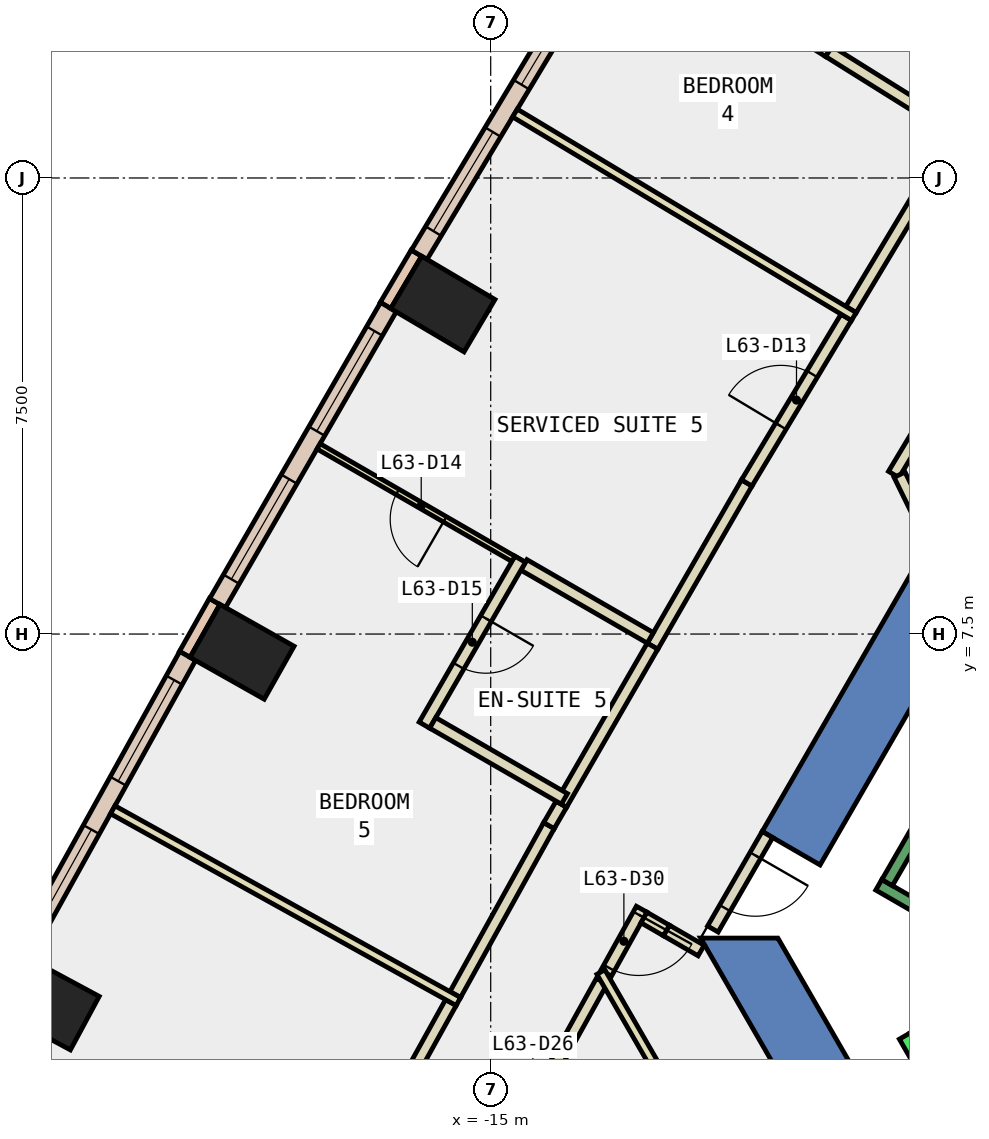
"""IFC4 building model, lengths in metres.
Left out: names, types, materials, properties, quantities, classifications, styles, units other than length and angle.
Written with IfcOpenShell. Run it as: python <this file> out.ifc"""

import sys

from ifc_helpers import new_model, si_unit, direction, frame, frame_2d, origin, origin_2d, place, context, subcontext, project, spatial, polyline, rectangle, outline, extrude, element, fill, save


model = new_model("IFC4")
c1 = context("Model", 3, precision=1e-05, world=origin(), true_north=direction((0.0, 1.0)))
c2 = subcontext(c1, "Body", "Model", "MODEL_VIEW")
j1 = project(units=[si_unit("LENGTHUNIT", "METRE"), si_unit("PLANEANGLEUNIT", "RADIAN")], contexts=[c1])
p1 = place(None, origin())
s1 = spatial("IfcSite", under=j1, at=p1, CompositionType="ELEMENT")
p2 = place(p1, origin())
s2 = spatial("IfcBuilding", under=s1, at=p2, CompositionType="ELEMENT")
p3 = place(p2, frame((0.0, 0.0, 273.8)))
s3 = spatial("IfcBuildingStorey", under=s2, at=p3, CompositionType="ELEMENT", Elevation=273.8)
for number, where, z_axis, x_axis in (
    (1, (-15.787, 12.927, -0.34), (0.0, 0.0, 1.0), (0.509, 0.861, 0.0)),
    (2, (-19.089, 7.208, -0.34), (0.0, 0.0, 1.0), (0.491, 0.871, 0.0)),
    (3, (-22.292, 1.433, -0.34), (0.0, 0.0, 1.0), (0.474, 0.881, 0.0)),
):
    element("IfcColumn", number, at=place(p3, frame(where, z_axis=z_axis, x_axis=x_axis)), inside=s3, PredefinedType="COLUMN", context=c2, shape_type="SweptSolid", body=[
        extrude(rectangle(XDim=1.0, YDim=1.4, at=origin_2d()), origin(), (0.0, 0.0, 1.0), 3.6),
    ])
p4 = place(p3, frame((0.0, 0.0, -0.34)))
e4 = element("IfcWall", 4, at=p4, inside=s3, PredefinedType="SHEAR", context=c2, shape_type="SweptSolid", body=[
    extrude(outline(polyline([(-10.535, 4.253), (-9.583, 3.703), (-5.138, 11.4), (-5.774, 12.5), (-10.535, 4.253)])), origin(), (0.0, 0.0, 1.0), 3.6),
])
p5 = place(p3, frame((0.0, 0.0, -0.34)))
e5 = element("IfcWall", 5, at=p5, inside=s3, PredefinedType="SHEAR", context=c2, shape_type="SweptSolid", body=[
    extrude(outline(polyline([(-11.547, 2.5), (-5.774, -7.5), (-5.138, -6.4), (-10.277, 2.5), (-11.547, 2.5)])), origin(), (0.0, 0.0, 1.0), 3.6),
])
p6 = place(p3, frame((-16.222, 13.765, 0.0), z_axis=(0.0, 0.0, 1.0), x_axis=(-0.508268432768, -0.861198699634, 0.0)))
e6 = element("IfcWall", 6, at=p6, inside=s3, PredefinedType="STANDARD", context=c2, shape_type="SweptSolid", body=[
    extrude(rectangle(XDim=1.0, YDim=0.2, at=frame_2d((0.5, 0.0))), origin(), (0.0, 0.0, 1.0), 3.26),
])
p7 = place(p3, frame((-19.54, 8.036, 0.0), z_axis=(0.0, 0.0, 1.0), x_axis=(-0.491848119507, -0.870681013539, 0.0)))
e7 = element("IfcWall", 7, at=p7, inside=s3, PredefinedType="STANDARD", context=c2, shape_type="SweptSolid", body=[
    extrude(rectangle(XDim=1.0, YDim=0.2, at=frame_2d((0.5, 0.0))), origin(), (0.0, 0.0, 1.0), 3.26),
])
p8 = place(p3, frame((-13.282, 18.554, 0.0), z_axis=(0.0, 0.0, 1.0), x_axis=(-0.515006791362, -0.857186096977, 0.0)))
e8 = element("IfcWall", 8, at=p8, inside=s3, PredefinedType="STANDARD", context=c2, shape_type="SweptSolid", body=[
    extrude(rectangle(XDim=5.619, YDim=0.3, at=frame_2d((2.81, 0.0))), origin(), (0.0, 0.0, 1.0), 3.26),
])
p9 = place(p8, frame((0.455, 0.0, 0.9)))
e9 = element("IfcOpeningElement", 9, at=p9, cuts=e8, PredefinedType="OPENING", context=c2, shape_type="SweptSolid", body=[
    extrude(rectangle(XDim=1.9, YDim=2.0, at=frame_2d((0.95, 1.0))), frame((0.0, 0.16, 0.0), z_axis=(0.0, -1.0, 0.0), x_axis=(1.0, 0.0, 0.0)), (0.0, 0.0, 1.0), 0.32),
])
p10 = place(p8, frame((3.265, 0.0, 0.9)))
e10 = element("IfcOpeningElement", 10, at=p10, cuts=e8, PredefinedType="OPENING", context=c2, shape_type="SweptSolid", body=[
    extrude(rectangle(XDim=1.9, YDim=2.0, at=frame_2d((0.95, 1.0))), frame((0.0, 0.16, 0.0), z_axis=(0.0, -1.0, 0.0), x_axis=(1.0, 0.0, 0.0)), (0.0, 0.0, 1.0), 0.32),
])
p11 = place(p3, frame((-16.682, 12.877, 0.0), z_axis=(0.0, 0.0, 1.0), x_axis=(-0.49999685976, -0.866027216796, 0.0)))
e11 = element("IfcWall", 11, at=p11, inside=s3, PredefinedType="STANDARD", context=c2, shape_type="SweptSolid", body=[
    extrude(rectangle(XDim=5.622, YDim=0.3, at=frame_2d((2.811, 0.0))), origin(), (0.0, 0.0, 1.0), 3.26),
])
p12 = place(p11, frame((0.456, 0.0, 0.9)))
e12 = element("IfcOpeningElement", 12, at=p12, cuts=e11, PredefinedType="OPENING", context=c2, shape_type="SweptSolid", body=[
    extrude(rectangle(XDim=1.9, YDim=2.0, at=frame_2d((0.95, 1.0))), frame((0.0, 0.16, 0.0), z_axis=(0.0, -1.0, 0.0), x_axis=(1.0, 0.0, 0.0)), (0.0, 0.0, 1.0), 0.32),
])
p13 = place(p11, frame((3.267, 0.0, 0.9)))
e13 = element("IfcOpeningElement", 13, at=p13, cuts=e11, PredefinedType="OPENING", context=c2, shape_type="SweptSolid", body=[
    extrude(rectangle(XDim=1.9, YDim=2.0, at=frame_2d((0.95, 1.0))), frame((0.0, 0.16, 0.0), z_axis=(0.0, -1.0, 0.0), x_axis=(1.0, 0.0, 0.0)), (0.0, 0.0, 1.0), 0.32),
])
p14 = place(p3, frame((-19.984, 7.14, 0.0), z_axis=(0.0, 0.0, 1.0), x_axis=(-0.485049005017, -0.874486971162, 0.0)))
e14 = element("IfcWall", 14, at=p14, inside=s3, PredefinedType="STANDARD", context=c2, shape_type="SweptSolid", body=[
    extrude(rectangle(XDim=5.62, YDim=0.3, at=frame_2d((2.81, 0.0))), origin(), (0.0, 0.0, 1.0), 3.26),
])
p15 = place(p14, frame((0.455, 0.0, 0.9)))
e15 = element("IfcOpeningElement", 15, at=p15, cuts=e14, PredefinedType="OPENING", context=c2, shape_type="SweptSolid", body=[
    extrude(rectangle(XDim=1.9, YDim=2.0, at=frame_2d((0.95, 1.0))), frame((0.0, 0.16, 0.0), z_axis=(0.0, -1.0, 0.0), x_axis=(1.0, 0.0, 0.0)), (0.0, 0.0, 1.0), 0.32),
])
p16 = place(p14, frame((3.265, 0.0, 0.9)))
e16 = element("IfcOpeningElement", 16, at=p16, cuts=e14, PredefinedType="OPENING", context=c2, shape_type="SweptSolid", body=[
    extrude(rectangle(XDim=1.9, YDim=2.0, at=frame_2d((0.95, 1.0))), frame((0.0, 0.16, 0.0), z_axis=(0.0, -1.0, 0.0), x_axis=(1.0, 0.0, 0.0)), (0.0, 0.0, 1.0), 0.32),
])
p17 = place(p3, frame((-11.539, 2.295, 0.0), z_axis=(0.0, 0.0, 1.0), x_axis=(-0.86577241902, 0.500437926684, 0.0)))
e17 = element("IfcWall", 17, at=p17, inside=s3, PredefinedType="PARTITIONING", context=c2, shape_type="SweptSolid", body=[
    extrude(rectangle(XDim=0.66, YDim=0.2, at=frame_2d((0.33, 0.0))), origin(), (0.0, 0.0, 1.0), 2.4),
])
p18 = place(p3, frame((-12.517, 2.975, 0.0), z_axis=(0.0, 0.0, 1.0), x_axis=(-0.485195833999, -0.87440551386, 0.0)))
e18 = element("IfcWall", 18, at=p18, inside=s3, PredefinedType="PARTITIONING", context=c2, shape_type="SweptSolid", body=[
    extrude(rectangle(XDim=1.206, YDim=0.2, at=frame_2d((0.603, 0.0))), origin(), (0.0, 0.0, 1.0), 3.26),
])
p19 = place(p18, frame((0.103, 0.0, 0.0)))
e19 = element("IfcOpeningElement", 19, at=p19, cuts=e18, PredefinedType="OPENING", context=c2, shape_type="SweptSolid", body=[
    extrude(rectangle(XDim=1.0, YDim=2.1, at=frame_2d((0.5, 1.05))), frame((0.0, 0.11, 0.0), z_axis=(0.0, -1.0, 0.0), x_axis=(1.0, 0.0, 0.0)), (0.0, 0.0, 1.0), 0.22),
])
p20 = place(p3, frame((-5.885, 14.264, 0.0), z_axis=(0.0, 0.0, 1.0), x_axis=(-0.514971458129, -0.857207324579, 0.0)))
e20 = element("IfcWall", 20, at=p20, inside=s3, PredefinedType="PARTITIONING", context=c2, shape_type="SweptSolid", body=[
    extrude(rectangle(XDim=4.83, YDim=0.2, at=frame_2d((2.415, 0.0))), origin(), (0.0, 0.0, 1.0), 3.26),
])
p21 = place(p20, frame((1.915, 0.0, 0.0)))
e21 = element("IfcOpeningElement", 21, at=p21, cuts=e20, PredefinedType="OPENING", context=c2, shape_type="SweptSolid", body=[
    extrude(rectangle(XDim=1.0, YDim=2.1, at=frame_2d((0.5, 1.05))), frame((0.0, 0.11, 0.0), z_axis=(0.0, -1.0, 0.0), x_axis=(1.0, 0.0, 0.0)), (0.0, 0.0, 1.0), 0.22),
])
p22 = place(p3, frame((-8.276, 10.12, 0.0), z_axis=(0.0, 0.0, 1.0), x_axis=(0.440226122236, -0.897886942382, 0.0)))
e22 = element("IfcWall", 22, at=p22, inside=s3, PredefinedType="PARTITIONING", context=c2, shape_type="SweptSolid", body=[
    extrude(rectangle(XDim=1.176, YDim=0.2, at=frame_2d((0.588, 0.0))), origin(), (0.0, 0.0, 1.0), 3.26),
])
p23 = place(p3, frame((-13.174, 1.79, 0.0), z_axis=(0.0, 0.0, 1.0), x_axis=(-0.485079003918, -0.874470331091, 0.0)))
e23 = element("IfcWall", 23, at=p23, inside=s3, PredefinedType="PARTITIONING", context=c2, shape_type="SweptSolid", body=[
    extrude(rectangle(XDim=4.669, YDim=0.2, at=frame_2d((2.334, 0.0))), origin(), (0.0, 0.0, 1.0), 3.26),
])
p24 = place(p23, frame((1.834, 0.0, 0.0)))
e24 = element("IfcOpeningElement", 24, at=p24, cuts=e23, PredefinedType="OPENING", context=c2, shape_type="SweptSolid", body=[
    extrude(rectangle(XDim=1.0, YDim=2.1, at=frame_2d((0.5, 1.05))), frame((0.0, 0.11, 0.0), z_axis=(0.0, -1.0, 0.0), x_axis=(1.0, 0.0, 0.0)), (0.0, 0.0, 1.0), 0.22),
])
p25 = place(p3, frame((-9.075, 12.837, 0.0), z_axis=(0.0, 0.0, 1.0), x_axis=(0.514620055475, 0.857418333431, 0.0)))
e25 = element("IfcWall", 25, at=p25, inside=s3, PredefinedType="PARTITIONING", context=c2, shape_type="SweptSolid", body=[
    extrude(rectangle(XDim=3.177, YDim=0.2, at=frame_2d((1.588, 0.0))), origin(), (0.0, 0.0, 1.0), 3.26),
])
p26 = place(p3, frame((-12.338, 7.3, 0.0), z_axis=(0.0, 0.0, 1.0), x_axis=(0.4996633593, 0.866219676164, 0.0)))
e26 = element("IfcWall", 26, at=p26, inside=s3, PredefinedType="PARTITIONING", context=c2, shape_type="SweptSolid", body=[
    extrude(rectangle(XDim=3.1, YDim=0.2, at=frame_2d((1.55, 0.0))), origin(), (0.0, 0.0, 1.0), 3.26),
])
p27 = place(p3, frame((-10.789, 9.985, 0.0), z_axis=(0.0, 0.0, 1.0), x_axis=(0.51487988517, 0.857262330823, 0.0)))
e27 = element("IfcWall", 27, at=p27, inside=s3, PredefinedType="PARTITIONING", context=c2, shape_type="SweptSolid", body=[
    extrude(rectangle(XDim=3.177, YDim=0.2, at=frame_2d((1.589, 0.0))), origin(), (0.0, 0.0, 1.0), 3.26),
])
p28 = place(p27, frame((1.089, 0.0, 0.0)))
e28 = element("IfcOpeningElement", 28, at=p28, cuts=e27, PredefinedType="OPENING", context=c2, shape_type="SweptSolid", body=[
    extrude(rectangle(XDim=1.0, YDim=2.1, at=frame_2d((0.5, 1.05))), frame((0.0, 0.11, 0.0), z_axis=(0.0, -1.0, 0.0), x_axis=(1.0, 0.0, 0.0)), (0.0, 0.0, 1.0), 0.22),
])
p29 = place(p3, frame((-15.583, 1.571, 0.0), z_axis=(0.0, 0.0, 1.0), x_axis=(0.484944791944, 0.874544766588, 0.0)))
e29 = element("IfcWall", 29, at=p29, inside=s3, PredefinedType="PARTITIONING", context=c2, shape_type="SweptSolid", body=[
    extrude(rectangle(XDim=3.178, YDim=0.2, at=frame_2d((1.589, 0.0))), origin(), (0.0, 0.0, 1.0), 3.26),
])
p30 = place(p3, frame((-14.042, 4.35, 0.0), z_axis=(0.0, 0.0, 1.0), x_axis=(0.501816902032, 0.864973870608, 0.0)))
e30 = element("IfcWall", 30, at=p30, inside=s3, PredefinedType="PARTITIONING", context=c2, shape_type="SweptSolid", body=[
    extrude(rectangle(XDim=0.407, YDim=0.2, at=frame_2d((0.203, 0.0))), origin(), (0.0, 0.0, 1.0), 3.26),
])
p31 = place(p3, frame((-13.838, 4.702, 0.0), z_axis=(0.0, 0.0, 1.0), x_axis=(0.499543983968, 0.866288524731, 0.0)))
e31 = element("IfcWall", 31, at=p31, inside=s3, PredefinedType="PARTITIONING", context=c2, shape_type="SweptSolid", body=[
    extrude(rectangle(XDim=3.0, YDim=0.2, at=frame_2d((1.5, 0.0))), origin(), (0.0, 0.0, 1.0), 3.26),
])
p32 = place(p3, frame((-17.196, -1.338, 0.0), z_axis=(0.0, 0.0, 1.0), x_axis=(0.485107756493, 0.87445438108, 0.0)))
e32 = element("IfcWall", 32, at=p32, inside=s3, PredefinedType="PARTITIONING", context=c2, shape_type="SweptSolid", body=[
    extrude(rectangle(XDim=3.177, YDim=0.2, at=frame_2d((1.588, 0.0))), origin(), (0.0, 0.0, 1.0), 3.26),
])
p33 = place(p3, frame((-13.188, 1.942, 0.0), z_axis=(0.0, 0.0, 1.0), x_axis=(0.500061177503, -0.865990080056, 0.0)))
e33 = element("IfcWall", 33, at=p33, inside=s3, PredefinedType="PARTITIONING", context=c2, shape_type="SweptSolid", body=[
    extrude(rectangle(XDim=6.447, YDim=0.15, at=frame_2d((3.224, 0.0))), origin(), (0.0, 0.0, 1.0), 3.26),
])
p34 = place(p3, frame((-7.907, 19.72, 0.0), z_axis=(0.0, 0.0, 1.0), x_axis=(-0.529915322147, -0.848050559433, 0.0)))
e34 = element("IfcWall", 34, at=p34, inside=s3, PredefinedType="PARTITIONING", context=c2, shape_type="SweptSolid", body=[
    extrude(rectangle(XDim=3.149, YDim=0.2, at=frame_2d((1.575, 0.0))), origin(), (0.0, 0.0, 1.0), 3.26),
])
p35 = place(p34, frame((1.125, 0.0, 0.0)))
e35 = element("IfcOpeningElement", 35, at=p35, cuts=e34, PredefinedType="OPENING", context=c2, shape_type="SweptSolid", body=[
    extrude(rectangle(XDim=0.9, YDim=2.1, at=frame_2d((0.45, 1.05))), frame((0.0, 0.11, 0.0), z_axis=(0.0, -1.0, 0.0), x_axis=(1.0, 0.0, 0.0)), (0.0, 0.0, 1.0), 0.22),
])
p36 = place(p3, frame((-9.438, 17.081, 0.0), z_axis=(0.0, 0.0, 1.0), x_axis=(0.847992817371, -0.530007718516, 0.0)))
e36 = element("IfcWall", 36, at=p36, inside=s3, PredefinedType="PARTITIONING", context=c2, shape_type="SweptSolid", body=[
    extrude(rectangle(XDim=2.5, YDim=0.2, at=frame_2d((1.25, 0.0))), origin(), (0.0, 0.0, 1.0), 3.26),
])
p37 = place(p3, frame((-9.028, 12.722, 0.0), z_axis=(0.0, 0.0, 1.0), x_axis=(-0.857330501016, 0.514766366449, 0.0)))
e37 = element("IfcWall", 37, at=p37, inside=s3, PredefinedType="PARTITIONING", context=c2, shape_type="SweptSolid", body=[
    extrude(rectangle(XDim=6.5, YDim=0.15, at=frame_2d((3.25, 0.0))), origin(), (0.0, 0.0, 1.0), 3.26),
])
p38 = place(p3, frame((-14.454, 8.637, 0.0), z_axis=(0.0, 0.0, 1.0), x_axis=(-0.865995823051, 0.500051231833, 0.0)))
e38 = element("IfcWall", 38, at=p38, inside=s3, PredefinedType="PARTITIONING", context=c2, shape_type="SweptSolid", body=[
    extrude(rectangle(XDim=3.899, YDim=0.1, at=frame_2d((1.95, 0.0))), origin(), (0.0, 0.0, 1.0), 3.26),
])
p39 = place(p38, frame((1.5, 0.0, 0.0)))
e39 = element("IfcOpeningElement", 39, at=p39, cuts=e38, PredefinedType="OPENING", context=c2, shape_type="SweptSolid", body=[
    extrude(rectangle(XDim=0.9, YDim=2.1, at=frame_2d((0.45, 1.05))), frame((0.0, 0.06, 0.0), z_axis=(0.0, -1.0, 0.0), x_axis=(1.0, 0.0, 0.0)), (0.0, 0.0, 1.0), 0.12),
])
p40 = place(p3, frame((-12.375, 7.437, 0.0), z_axis=(0.0, 0.0, 1.0), x_axis=(-0.866100915363, 0.499869187296, 0.0)))
e40 = element("IfcWall", 40, at=p40, inside=s3, PredefinedType="PARTITIONING", context=c2, shape_type="SweptSolid", body=[
    extrude(rectangle(XDim=2.401, YDim=0.2, at=frame_2d((1.2, 0.0))), origin(), (0.0, 0.0, 1.0), 3.26),
])
p41 = place(p3, frame((-14.515, 8.73, 0.0), z_axis=(0.0, 0.0, 1.0), x_axis=(-0.500039995618, -0.866002311072, 0.0)))
e41 = element("IfcWall", 41, at=p41, inside=s3, PredefinedType="PARTITIONING", context=c2, shape_type="SweptSolid", body=[
    extrude(rectangle(XDim=3.15, YDim=0.2, at=frame_2d((1.575, 0.0))), origin(), (0.0, 0.0, 1.0), 3.26),
])
p42 = place(p41, frame((1.125, 0.0, 0.0)))
e42 = element("IfcOpeningElement", 42, at=p42, cuts=e41, PredefinedType="OPENING", context=c2, shape_type="SweptSolid", body=[
    extrude(rectangle(XDim=0.9, YDim=2.1, at=frame_2d((0.45, 1.05))), frame((0.0, 0.11, 0.0), z_axis=(0.0, -1.0, 0.0), x_axis=(1.0, 0.0, 0.0)), (0.0, 0.0, 1.0), 0.22),
])
p43 = place(p3, frame((-15.953, 6.039, 0.0), z_axis=(0.0, 0.0, 1.0), x_axis=(0.865998541277, -0.500046524342, 0.0)))
e43 = element("IfcWall", 43, at=p43, inside=s3, PredefinedType="PARTITIONING", context=c2, shape_type="SweptSolid", body=[
    extrude(rectangle(XDim=2.5, YDim=0.2, at=frame_2d((1.25, 0.0))), origin(), (0.0, 0.0, 1.0), 3.26),
])
p44 = place(p3, frame((-15.532, 1.457, 0.0), z_axis=(0.0, 0.0, 1.0), x_axis=(-0.874467143452, 0.485084750351, 0.0)))
e44 = element("IfcWall", 44, at=p44, inside=s3, PredefinedType="PARTITIONING", context=c2, shape_type="SweptSolid", body=[
    extrude(rectangle(XDim=6.5, YDim=0.15, at=frame_2d((3.25, 0.0))), origin(), (0.0, 0.0, 1.0), 3.26),
])
p45 = place(p3, frame((-10.449, 4.203, 0.0), z_axis=(0.0, 0.0, 1.0), x_axis=(-0.499914839587, -0.866074565589, 0.0)))
e45 = element("IfcWall", 45, at=p45, inside=s3, PredefinedType="PARTITIONING", context=c2, shape_type="SweptSolid", body=[
    extrude(rectangle(XDim=1.794, YDim=0.2, at=frame_2d((0.897, 0.0))), origin(), (0.0, 0.0, 1.0), 2.4),
])
p46 = place(p45, frame((0.397, 0.0, 0.0)))
e46 = element("IfcOpeningElement", 46, at=p46, cuts=e45, PredefinedType="OPENING", context=c2, shape_type="SweptSolid", body=[
    extrude(rectangle(XDim=1.0, YDim=2.1, at=frame_2d((0.5, 1.05))), frame((0.0, 0.11, 0.0), z_axis=(0.0, -1.0, 0.0), x_axis=(1.0, 0.0, 0.0)), (0.0, 0.0, 1.0), 0.22),
])
p47 = place(p3, frame((-12.11, 2.625, 0.0), z_axis=(0.0, 0.0, 1.0), x_axis=(-0.86611877815, 0.499838235968, 0.0)))
e47 = element("IfcWall", 47, at=p47, inside=s3, PredefinedType="PARTITIONING", context=c2, shape_type="SweptSolid", body=[
    extrude(rectangle(XDim=0.426, YDim=0.2, at=frame_2d((0.213, 0.0))), origin(), (0.0, 0.0, 1.0), 3.26),
])
p48 = place(p3, frame((-8.192, 0.888, 0.0), z_axis=(0.0, 0.0, 1.0), x_axis=(0.500034260056, -0.866005622828, 0.0)))
e48 = element("IfcWall", 48, at=p48, inside=s3, PredefinedType="STANDARD", context=c2, shape_type="SweptSolid", body=[
    extrude(rectangle(XDim=5.399, YDim=0.2, at=frame_2d((2.7, 0.0))), origin(), (0.0, 0.0, 1.0), 3.26),
])
p49 = place(p3, frame((-6.25, 2.01, 0.0), z_axis=(0.0, 0.0, 1.0), x_axis=(-0.86611865017, 0.499838457731, 0.0)))
e49 = element("IfcWall", 49, at=p49, inside=s3, PredefinedType="STANDARD", context=c2, shape_type="SweptSolid", body=[
    extrude(rectangle(XDim=2.733, YDim=0.2, at=frame_2d((1.366, 0.0))), origin(), (0.0, 0.0, 1.0), 3.26),
])
p50 = place(p3, frame((-5.03, 9.388, 0.0), z_axis=(0.0, 0.0, 1.0), x_axis=(-0.499978703459, -0.866037698999, 0.0)))
e50 = element("IfcWall", 50, at=p50, inside=s3, PredefinedType="STANDARD", context=c2, shape_type="SweptSolid", body=[
    extrude(rectangle(XDim=6.9, YDim=0.2, at=frame_2d((3.45, 0.0))), origin(), (0.0, 0.0, 1.0), 3.26),
])
p51 = place(p9, origin())
e51 = element("IfcWindow", 51, at=p51, inside=s3, PartitioningType="SINGLE_PANEL", PredefinedType="WINDOW", context=c2, shape_type="SweptSolid", body=[
    extrude(rectangle(XDim=1.9, YDim=2.0, at=frame_2d((0.95, 1.0))), frame((0.0, 0.03, 0.0), z_axis=(0.0, -1.0, 0.0), x_axis=(1.0, 0.0, 0.0)), (0.0, 0.0, 1.0), 0.06),
])
fill(e9, e51)
p52 = place(p10, origin())
e52 = element("IfcWindow", 52, at=p52, inside=s3, PartitioningType="SINGLE_PANEL", PredefinedType="WINDOW", context=c2, shape_type="SweptSolid", body=[
    extrude(rectangle(XDim=1.9, YDim=2.0, at=frame_2d((0.95, 1.0))), frame((0.0, 0.03, 0.0), z_axis=(0.0, -1.0, 0.0), x_axis=(1.0, 0.0, 0.0)), (0.0, 0.0, 1.0), 0.06),
])
fill(e10, e52)
p53 = place(p12, origin())
e53 = element("IfcWindow", 53, at=p53, inside=s3, PartitioningType="SINGLE_PANEL", PredefinedType="WINDOW", context=c2, shape_type="SweptSolid", body=[
    extrude(rectangle(XDim=1.9, YDim=2.0, at=frame_2d((0.95, 1.0))), frame((0.0, 0.03, 0.0), z_axis=(0.0, -1.0, 0.0), x_axis=(1.0, 0.0, 0.0)), (0.0, 0.0, 1.0), 0.06),
])
fill(e12, e53)
p54 = place(p13, origin())
e54 = element("IfcWindow", 54, at=p54, inside=s3, PartitioningType="SINGLE_PANEL", PredefinedType="WINDOW", context=c2, shape_type="SweptSolid", body=[
    extrude(rectangle(XDim=1.9, YDim=2.0, at=frame_2d((0.95, 1.0))), frame((0.0, 0.03, 0.0), z_axis=(0.0, -1.0, 0.0), x_axis=(1.0, 0.0, 0.0)), (0.0, 0.0, 1.0), 0.06),
])
fill(e13, e54)
p55 = place(p15, origin())
e55 = element("IfcWindow", 55, at=p55, inside=s3, PartitioningType="SINGLE_PANEL", PredefinedType="WINDOW", context=c2, shape_type="SweptSolid", body=[
    extrude(rectangle(XDim=1.9, YDim=2.0, at=frame_2d((0.95, 1.0))), frame((0.0, 0.03, 0.0), z_axis=(0.0, -1.0, 0.0), x_axis=(1.0, 0.0, 0.0)), (0.0, 0.0, 1.0), 0.06),
])
fill(e15, e55)
p56 = place(p16, origin())
e56 = element("IfcWindow", 56, at=p56, inside=s3, PartitioningType="SINGLE_PANEL", PredefinedType="WINDOW", context=c2, shape_type="SweptSolid", body=[
    extrude(rectangle(XDim=1.9, YDim=2.0, at=frame_2d((0.95, 1.0))), frame((0.0, 0.03, 0.0), z_axis=(0.0, -1.0, 0.0), x_axis=(1.0, 0.0, 0.0)), (0.0, 0.0, 1.0), 0.06),
])
fill(e16, e56)
p57 = place(p28, origin())
e57 = element("IfcDoor", 57, at=p57, inside=s3, OperationType="SINGLE_SWING_RIGHT", PredefinedType="DOOR", context=c2, shape_type="SweptSolid", body=[
    extrude(rectangle(XDim=1.0, YDim=2.1, at=frame_2d((0.5, 1.05))), frame((0.0, 0.025, 0.0), z_axis=(0.0, -1.0, 0.0), x_axis=(1.0, 0.0, 0.0)), (0.0, 0.0, 1.0), 0.05),
])
fill(e28, e57)
p58 = place(p39, origin())
e58 = element("IfcDoor", 58, at=p58, inside=s3, OperationType="SINGLE_SWING_LEFT", PredefinedType="DOOR", context=c2, shape_type="SweptSolid", body=[
    extrude(rectangle(XDim=0.9, YDim=2.1, at=frame_2d((0.45, 1.05))), frame((0.0, 0.025, 0.0), z_axis=(0.0, -1.0, 0.0), x_axis=(1.0, 0.0, 0.0)), (0.0, 0.0, 1.0), 0.05),
])
fill(e39, e58)
p59 = place(p42, origin())
e59 = element("IfcDoor", 59, at=p59, inside=s3, OperationType="SINGLE_SWING_LEFT", PredefinedType="DOOR", context=c2, shape_type="SweptSolid", body=[
    extrude(rectangle(XDim=0.9, YDim=2.1, at=frame_2d((0.45, 1.05))), frame((0.0, 0.025, 0.0), z_axis=(0.0, -1.0, 0.0), x_axis=(1.0, 0.0, 0.0)), (0.0, 0.0, 1.0), 0.05),
])
fill(e42, e59)
p60 = place(p19, origin())
e60 = element("IfcDoor", 60, at=p60, inside=s3, OperationType="SINGLE_SWING_RIGHT", PredefinedType="DOOR", context=c2, shape_type="SweptSolid", body=[
    extrude(rectangle(XDim=1.0, YDim=2.1, at=frame_2d((0.5, 1.05))), frame((0.0, 0.025, 0.0), z_axis=(0.0, -1.0, 0.0), x_axis=(1.0, 0.0, 0.0)), (0.0, 0.0, 1.0), 0.05),
])
fill(e19, e60)
p61 = place(p46, origin())
e61 = element("IfcDoor", 61, at=p61, inside=s3, OperationType="SINGLE_SWING_LEFT", PredefinedType="DOOR", context=c2, shape_type="SweptSolid", body=[
    extrude(rectangle(XDim=1.0, YDim=2.1, at=frame_2d((0.5, 1.05))), frame((0.0, 0.025, 0.0), z_axis=(0.0, -1.0, 0.0), x_axis=(1.0, 0.0, 0.0)), (0.0, 0.0, 1.0), 0.05),
])
fill(e46, e61)
save(model, sys.argv[1])
